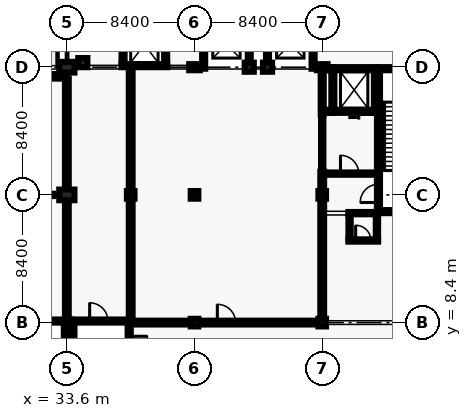
"""IFC4 building model, lengths in metres.
Left out: names, types, materials, properties, quantities, classifications, styles, units other than length and angle.
Written with IfcOpenShell. Run it as: python <this file> out.ifc"""

import sys

from ifc_helpers import new_model, si_unit, direction, frame, frame_2d, origin, origin_2d, place, context, subcontext, project, spatial, rectangle, extrude, element, fill, save


model = new_model("IFC4")
c1 = context("Model", 3, precision=1e-05, world=origin(), true_north=direction((0.0, 1.0)))
c2 = subcontext(c1, "Body", "Model", "MODEL_VIEW")
j1 = project(units=[si_unit("LENGTHUNIT", "METRE"), si_unit("PLANEANGLEUNIT", "RADIAN")], contexts=[c1])
p1 = place(None, origin())
s1 = spatial("IfcSite", under=j1, at=p1, CompositionType="ELEMENT")
p2 = place(p1, origin())
s2 = spatial("IfcBuilding", under=s1, at=p2, CompositionType="ELEMENT")
p3 = place(p2, frame((0.0, 0.0, 10.2)))
s3 = spatial("IfcBuildingStorey", under=s2, at=p3, CompositionType="ELEMENT", Elevation=10.2)
p4 = place(p3, frame((29.4, 8.5, 0.0), z_axis=(0.0, 0.0, 1.0), x_axis=(1.0, 0.0, 0.0)))
e1 = element("IfcWall", 1, at=p4, inside=s3, PredefinedType="SHEAR", context=c2, shape_type="SweptSolid", body=[
    extrude(rectangle(XDim=4.2, YDim=0.2, at=frame_2d((2.1, 0.0))), origin(), (0.0, 0.0, 1.0), 4.8),
])
p5 = place(p4, frame((1.5, 0.0, 0.0)))
e2 = element("IfcOpeningElement", 2, at=p5, cuts=e1, PredefinedType="OPENING", context=c2, shape_type="SweptSolid", body=[
    extrude(rectangle(XDim=1.2, YDim=2.1, at=frame_2d((0.6, 1.05))), frame((0.0, 0.11, 0.0), z_axis=(0.0, -1.0, 0.0), x_axis=(1.0, 0.0, 0.0)), (0.0, 0.0, 1.0), 0.22),
])
p6 = place(p3, frame((33.5, 8.4, 0.0), z_axis=(0.0, 0.0, 1.0), x_axis=(0.0, -1.0, 0.0)))
e3 = element("IfcWall", 3, at=p6, inside=s3, PredefinedType="SHEAR", context=c2, shape_type="SweptSolid", body=[
    extrude(rectangle(XDim=8.2, YDim=0.2, at=frame_2d((4.1, 0.0))), origin(), (0.0, 0.0, 1.0), 4.8),
])
p7 = place(p3, frame((33.9, 8.5, 0.0), z_axis=(0.0, 0.0, 1.0), x_axis=(1.0, 0.0, 0.0)))
e4 = element("IfcWall", 4, at=p7, inside=s3, PredefinedType="SHEAR", context=c2, shape_type="SweptSolid", body=[
    extrude(rectangle(XDim=3.9, YDim=0.2, at=frame_2d((1.95, 0.0))), origin(), (0.0, 0.0, 1.0), 4.8),
])
p8 = place(p7, frame((1.2, 0.0, 0.0)))
e5 = element("IfcOpeningElement", 5, at=p8, cuts=e4, PredefinedType="OPENING", context=c2, shape_type="SweptSolid", body=[
    extrude(rectangle(XDim=1.2, YDim=2.1, at=frame_2d((0.6, 1.05))), frame((0.0, 0.11, 0.0), z_axis=(0.0, -1.0, 0.0), x_axis=(1.0, 0.0, 0.0)), (0.0, 0.0, 1.0), 0.22),
])
p9 = place(p3, frame((34.0, 0.2, 0.0), z_axis=(0.0, 0.0, 1.0), x_axis=(0.0, 1.0, 0.0)))
e6 = element("IfcWall", 6, at=p9, inside=s3, PredefinedType="SHEAR", context=c2, shape_type="SweptSolid", body=[
    extrude(rectangle(XDim=8.2, YDim=0.2, at=frame_2d((4.1, 0.0))), origin(), (0.0, 0.0, 1.0), 4.8),
])
p10 = place(p3, frame((37.7, 8.4, 0.0), z_axis=(0.0, 0.0, 1.0), x_axis=(0.0, -1.0, 0.0)))
e7 = element("IfcWall", 7, at=p10, inside=s3, PredefinedType="SHEAR", context=c2, shape_type="SweptSolid", body=[
    extrude(rectangle(XDim=8.2, YDim=0.2, at=frame_2d((4.1, 0.0))), origin(), (0.0, 0.0, 1.0), 4.8),
])
p11 = place(p10, frame((0.9, 0.0, 0.0)))
e8 = element("IfcOpeningElement", 8, at=p11, cuts=e7, PredefinedType="OPENING", context=c2, shape_type="SweptSolid", body=[
    extrude(rectangle(XDim=1.2, YDim=2.1, at=frame_2d((0.6, 1.05))), frame((0.0, 0.11, 0.0), z_axis=(0.0, -1.0, 0.0), x_axis=(1.0, 0.0, 0.0)), (0.0, 0.0, 1.0), 0.22),
])
p12 = place(p3, frame((58.8, 15.7, 0.0), z_axis=(0.0, 0.0, 1.0), x_axis=(-1.0, 0.0, 0.0)))
e9 = element("IfcWall", 9, at=p12, inside=s3, PredefinedType="SHEAR", context=c2, shape_type="SweptSolid", body=[
    extrude(rectangle(XDim=4.8, YDim=0.2, at=frame_2d((2.4, 0.0))), origin(), (0.0, 0.0, 1.0), 4.8),
])
p13 = place(p12, frame((1.9, 0.0, 0.0)))
e10 = element("IfcOpeningElement", 10, at=p13, cuts=e9, PredefinedType="OPENING", context=c2, shape_type="SweptSolid", body=[
    extrude(rectangle(XDim=1.2, YDim=2.1, at=frame_2d((0.6, 1.05))), frame((0.0, 0.11, 0.0), z_axis=(0.0, -1.0, 0.0), x_axis=(1.0, 0.0, 0.0)), (0.0, 0.0, 1.0), 0.22),
])
p14 = place(p3, frame((54.0, 25.1, 0.0), z_axis=(0.0, 0.0, 1.0), x_axis=(1.0, 0.0, 0.0)))
e11 = element("IfcWall", 11, at=p14, inside=s3, PredefinedType="SHEAR", context=c2, shape_type="SweptSolid", body=[
    extrude(rectangle(XDim=4.8, YDim=0.2, at=frame_2d((2.4, 0.0))), origin(), (0.0, 0.0, 1.0), 4.8),
])
p15 = place(p3, frame((54.1, 15.8, 0.0), z_axis=(0.0, 0.0, 1.0), x_axis=(0.0, 1.0, 0.0)))
e12 = element("IfcWall", 12, at=p15, inside=s3, PredefinedType="SHEAR", context=c2, shape_type="SweptSolid", body=[
    extrude(rectangle(XDim=9.2, YDim=0.2, at=frame_2d((4.6, 0.0))), origin(), (0.0, 0.0, 1.0), 4.8),
])
p16 = place(p15, frame((0.5, 0.0, 0.0)))
e13 = element("IfcOpeningElement", 13, at=p16, cuts=e12, PredefinedType="OPENING", context=c2, shape_type="SweptSolid", body=[
    extrude(rectangle(XDim=1.2, YDim=2.1, at=frame_2d((0.6, 1.05))), frame((0.0, 0.11, 0.0), z_axis=(0.0, -1.0, 0.0), x_axis=(1.0, 0.0, 0.0)), (0.0, 0.0, 1.0), 0.22),
])
p17 = place(p3, frame((54.0, 22.3, 0.0), z_axis=(0.0, 0.0, 1.0), x_axis=(-1.0, 0.0, 0.0)))
e14 = element("IfcWall", 14, at=p17, inside=s3, PredefinedType="SHEAR", context=c2, shape_type="SweptSolid", body=[
    extrude(rectangle(XDim=3.0, YDim=0.2, at=frame_2d((1.5, 0.0))), origin(), (0.0, 0.0, 1.0), 4.8),
])
p18 = place(p17, frame((0.95, 0.0, 0.0)))
e15 = element("IfcOpeningElement", 15, at=p18, cuts=e14, PredefinedType="OPENING", context=c2, shape_type="SweptSolid", body=[
    extrude(rectangle(XDim=1.1, YDim=2.1, at=frame_2d((0.55, 1.05))), frame((0.0, 0.11, 0.0), z_axis=(0.0, -1.0, 0.0), x_axis=(1.0, 0.0, 0.0)), (0.0, 0.0, 1.0), 0.22),
])
p19 = place(p3, frame((51.0, 25.1, 0.0), z_axis=(0.0, 0.0, 1.0), x_axis=(1.0, 0.0, 0.0)))
e16 = element("IfcWall", 16, at=p19, inside=s3, PredefinedType="SHEAR", context=c2, shape_type="SweptSolid", body=[
    extrude(rectangle(XDim=3.0, YDim=0.2, at=frame_2d((1.5, 0.0))), origin(), (0.0, 0.0, 1.0), 4.8),
])
for number, where, z_axis, x_axis in (
    (17, (51.1, 22.4, 0.0), (0.0, 0.0, 1.0), (0.0, 1.0, 0.0)),
    (18, (53.9, 25.0, 0.0), (0.0, 0.0, 1.0), (0.0, -1.0, 0.0)),
):
    element("IfcWall", number, at=place(p3, frame(where, z_axis=z_axis, x_axis=x_axis)), inside=s3, PredefinedType="SHEAR", context=c2, shape_type="SweptSolid", body=[
        extrude(rectangle(XDim=2.6, YDim=0.2, at=frame_2d((1.3, 0.0))), origin(), (0.0, 0.0, 1.0), 4.8),
    ])
p20 = place(p3, frame((40.2, 25.3, 0.0), z_axis=(0.0, 0.0, 1.0), x_axis=(-1.0, 0.0, 0.0)))
e19 = element("IfcWall", 19, at=p20, inside=s3, PredefinedType="SHEAR", context=c2, shape_type="SweptSolid", body=[
    extrude(rectangle(XDim=3.0, YDim=0.2, at=frame_2d((1.5, 0.0))), origin(), (0.0, 0.0, 1.0), 4.8),
])
for number, where, z_axis, x_axis in (
    (20, (37.3, 25.4, 0.0), (0.0, 0.0, 1.0), (0.0, 1.0, 0.0)),
    (21, (40.1, 28.0, 0.0), (0.0, 0.0, 1.0), (0.0, -1.0, 0.0)),
):
    element("IfcWall", number, at=place(p3, frame(where, z_axis=z_axis, x_axis=x_axis)), inside=s3, PredefinedType="SHEAR", context=c2, shape_type="SweptSolid", body=[
        extrude(rectangle(XDim=2.6, YDim=0.2, at=frame_2d((1.3, 0.0))), origin(), (0.0, 0.0, 1.0), 4.8),
    ])
for number, where, z_axis, x_axis in (
    (22, (33.6, 16.8, 0.0), (0.0, 0.0, 1.0), (0.0, 1.0, 0.0)),
    (23, (33.6, 25.2, 0.0), (0.0, 0.0, 1.0), (1.0, 0.0, 0.0)),
):
    element("IfcColumn", number, at=place(p3, frame(where, z_axis=z_axis, x_axis=x_axis)), inside=s3, PredefinedType="COLUMN", context=c2, shape_type="SweptSolid", body=[
        extrude(rectangle(XDim=1.0, YDim=0.7, at=origin_2d()), origin(), (0.0, 0.0, 1.0), 4.8),
    ])
for number, where, z_axis, x_axis in (
    (24, (42.0, 8.4, 0.0), (0.0, 0.0, 1.0), (1.0, 0.0, 0.0)),
    (25, (42.0, 16.8, 0.0), (0.0, 0.0, 1.0), (1.0, 0.0, 0.0)),
):
    element("IfcColumn", number, at=place(p3, frame(where, z_axis=z_axis, x_axis=x_axis)), inside=s3, PredefinedType="COLUMN", context=c2, shape_type="SweptSolid", body=[
        extrude(rectangle(XDim=0.5, YDim=0.5, at=origin_2d()), origin(), (0.0, 0.0, 1.0), 4.8),
    ])
p21 = place(p3, frame((42.0, 25.2, 0.0), z_axis=(0.0, 0.0, 1.0), x_axis=(1.0, 0.0, 0.0)))
e26 = element("IfcColumn", 26, at=p21, inside=s3, PredefinedType="COLUMN", context=c2, shape_type="SweptSolid", body=[
    extrude(rectangle(XDim=0.7, YDim=0.4, at=origin_2d()), origin(), (0.0, 0.0, 1.0), 4.8),
])
for number, where, z_axis, x_axis in (
    (27, (50.4, 8.4, 0.0), (0.0, 0.0, 1.0), (1.0, 0.0, 0.0)),
    (28, (50.4, 16.8, 0.0), (0.0, 0.0, 1.0), (1.0, 0.0, 0.0)),
):
    element("IfcColumn", number, at=place(p3, frame(where, z_axis=z_axis, x_axis=x_axis)), inside=s3, PredefinedType="COLUMN", context=c2, shape_type="SweptSolid", body=[
        extrude(rectangle(XDim=0.5, YDim=0.5, at=origin_2d()), origin(), (0.0, 0.0, 1.0), 4.8),
    ])
p22 = place(p3, frame((50.4, 25.2, 0.0), z_axis=(0.0, 0.0, 1.0), x_axis=(1.0, 0.0, 0.0)))
e29 = element("IfcColumn", 29, at=p22, inside=s3, PredefinedType="COLUMN", context=c2, shape_type="SweptSolid", body=[
    extrude(rectangle(XDim=0.7, YDim=0.4, at=origin_2d()), origin(), (0.0, 0.0, 1.0), 4.8),
])
p23 = place(p3, frame((34.65, 25.5, 0.0), z_axis=(0.0, 0.0, 1.0), x_axis=(1.0, 0.0, 0.0)))
e30 = element("IfcColumn", 30, at=p23, inside=s3, PredefinedType="COLUMN", context=c2, shape_type="SweptSolid", body=[
    extrude(rectangle(XDim=0.6, YDim=0.6, at=origin_2d()), origin(), (0.0, 0.0, 1.0), 4.8),
])
p24 = place(p3, frame((33.6, 8.5, 0.0), z_axis=(0.0, 0.0, 1.0), x_axis=(1.0, 0.0, 0.0)))
e31 = element("IfcWall", 31, at=p24, inside=s3, PredefinedType="SHEAR", context=c2, shape_type="SweptSolid", body=[
    extrude(rectangle(XDim=0.3, YDim=0.2, at=frame_2d((0.15, 0.0))), origin(), (0.0, 0.0, 1.0), 4.8),
])
p25 = place(p3, frame((51.0, 22.3, 0.0), z_axis=(0.0, 0.0, 1.0), x_axis=(-1.0, 0.0, 0.0)))
e32 = element("IfcWall", 32, at=p25, inside=s3, PredefinedType="SHEAR", context=c2, shape_type="SweptSolid", body=[
    extrude(rectangle(XDim=0.5, YDim=0.2, at=frame_2d((0.25, 0.0))), origin(), (0.0, 0.0, 1.0), 4.8),
])
p26 = place(p3, frame((50.75, 25.1, 0.0), z_axis=(0.0, 0.0, 1.0), x_axis=(1.0, 0.0, 0.0)))
e33 = element("IfcWall", 33, at=p26, inside=s3, PredefinedType="SHEAR", context=c2, shape_type="SweptSolid", body=[
    extrude(rectangle(XDim=0.25, YDim=0.2, at=frame_2d((0.125, 0.0))), origin(), (0.0, 0.0, 1.0), 4.8),
])
for number, where, z_axis, x_axis in (
    (34, (45.599, 25.2, 0.0), (0.0, 0.0, 1.0), (1.0, 0.0, 0.0)),
    (35, (46.801, 25.2, 0.0), (0.0, 0.0, 1.0), (1.0, 0.0, 0.0)),
):
    element("IfcColumn", number, at=place(p3, frame(where, z_axis=z_axis, x_axis=x_axis)), inside=s3, PredefinedType="COLUMN", context=c2, shape_type="SweptSolid", body=[
        extrude(rectangle(XDim=0.6, YDim=0.6, at=origin_2d()), origin(), (0.0, 0.0, 1.0), 4.8),
    ])
p27 = place(p3, frame((37.801, 16.8, 0.0), z_axis=(0.0, 0.0, 1.0), x_axis=(1.0, 0.0, 0.0)))
e36 = element("IfcColumn", 36, at=p27, inside=s3, PredefinedType="COLUMN", context=c2, shape_type="SweptSolid", body=[
    extrude(rectangle(XDim=0.5, YDim=0.5, at=origin_2d()), origin(), (0.0, 0.0, 1.0), 4.8),
])
p28 = place(p3, frame((26.95, 24.6, 0.0), z_axis=(0.0, 0.0, 1.0), x_axis=(1.0, 0.0, 0.0)))
e37 = element("IfcWall", 37, at=p28, inside=s3, PredefinedType="SOLIDWALL", context=c2, shape_type="SweptSolid", body=[
    extrude(rectangle(XDim=6.525, YDim=0.3, at=frame_2d((3.262, 0.0))), origin(), (0.0, 0.0, 1.0), 4.5),
])
p29 = place(p28, frame((1.825, 0.0, 0.9)))
e38 = element("IfcOpeningElement", 38, at=p29, cuts=e37, PredefinedType="OPENING", context=c2, shape_type="SweptSolid", body=[
    extrude(rectangle(XDim=2.4, YDim=1.5, at=frame_2d((1.2, 0.75))), frame((0.0, 0.16, 0.0), z_axis=(0.0, -1.0, 0.0), x_axis=(1.0, 0.0, 0.0)), (0.0, 0.0, 1.0), 0.32),
])
p30 = place(p3, frame((37.675, 8.4, 0.0), z_axis=(0.0, 0.0, 1.0), x_axis=(1.0, 0.0, 0.0)))
e39 = element("IfcWall", 39, at=p30, inside=s3, PredefinedType="PARTITIONING", context=c2, shape_type="SweptSolid", body=[
    extrude(rectangle(XDim=12.85, YDim=0.25, at=frame_2d((6.425, 0.0))), origin(), (0.0, 0.0, 1.0), 3.8),
])
p31 = place(p30, frame((5.825, 0.0, 0.0)))
e40 = element("IfcOpeningElement", 40, at=p31, cuts=e39, PredefinedType="OPENING", context=c2, shape_type="SweptSolid", body=[
    extrude(rectangle(XDim=1.2, YDim=2.1, at=frame_2d((0.6, 1.05))), frame((0.0, 0.135, 0.0), z_axis=(0.0, -1.0, 0.0), x_axis=(1.0, 0.0, 0.0)), (0.0, 0.0, 1.0), 0.27),
])
p32 = place(p3, frame((33.6, 8.6, 0.0), z_axis=(0.0, 0.0, 1.0), x_axis=(0.0, 1.0, 0.0)))
e41 = element("IfcWall", 41, at=p32, inside=s3, PredefinedType="SOLIDWALL", context=c2, shape_type="SweptSolid", body=[
    extrude(rectangle(XDim=15.85, YDim=0.25, at=frame_2d((7.925, 0.0))), origin(), (0.0, 0.0, 1.0), 3.8),
])
p33 = place(p3, frame((37.8, 8.525, 0.0), z_axis=(0.0, 0.0, 1.0), x_axis=(0.0, 1.0, 0.0)))
e42 = element("IfcWall", 42, at=p33, inside=s3, PredefinedType="PARTITIONING", context=c2, shape_type="SweptSolid", body=[
    extrude(rectangle(XDim=16.675, YDim=0.25, at=frame_2d((8.337, 0.0))), origin(), (0.0, 0.0, 1.0), 3.8),
])
p34 = place(p3, frame((50.4, 8.525, 0.0), z_axis=(0.0, 0.0, 1.0), x_axis=(0.0, 1.0, 0.0)))
e43 = element("IfcWall", 43, at=p34, inside=s3, PredefinedType="PARTITIONING", context=c2, shape_type="SweptSolid", body=[
    extrude(rectangle(XDim=9.8, YDim=0.25, at=frame_2d((4.9, 0.0))), origin(), (0.0, 0.0, 1.0), 3.8),
])
for number, where, z_axis, x_axis in (
    (44, (42.6, 25.1, 0.0), (0.0, 0.0, 1.0), (0.0, 1.0, 0.0)),
    (45, (45.6, 25.1, 0.0), (0.0, 0.0, 1.0), (0.0, 1.0, 0.0)),
    (46, (46.8, 25.1, 0.0), (0.0, 0.0, 1.0), (0.0, 1.0, 0.0)),
    (47, (49.8, 25.1, 0.0), (0.0, 0.0, 1.0), (0.0, 1.0, 0.0)),
):
    element("IfcWall", number, at=place(p3, frame(where, z_axis=z_axis, x_axis=x_axis)), inside=s3, PredefinedType="SHEAR", context=c2, shape_type="SweptSolid", body=[
        extrude(rectangle(XDim=3.0, YDim=0.2, at=frame_2d((1.5, 0.0))), origin(), (0.0, 0.0, 1.0), 4.5),
    ])
p35 = place(p3, frame((50.4, 22.1, 0.0), z_axis=(0.0, 0.0, 1.0), x_axis=(0.0, 1.0, 0.0)))
e48 = element("IfcWall", 48, at=p35, inside=s3, PredefinedType="SHEAR", context=c2, shape_type="SweptSolid", body=[
    extrude(rectangle(XDim=3.2, YDim=0.2, at=frame_2d((1.6, 0.0))), origin(), (0.0, 0.0, 1.0), 4.5),
])
p36 = place(p3, frame((52.125, 13.8, 0.0), z_axis=(0.0, 0.0, 1.0), x_axis=(1.0, 0.0, 0.0)))
e49 = element("IfcWall", 49, at=p36, inside=s3, PredefinedType="PARTITIONING", context=c2, shape_type="SweptSolid", body=[
    extrude(rectangle(XDim=1.95, YDim=0.15, at=frame_2d((0.975, 0.0))), origin(), (0.0, 0.0, 1.0), 4.5),
])
p37 = place(p36, frame((0.475, 0.0, 0.0)))
e50 = element("IfcOpeningElement", 50, at=p37, cuts=e49, PredefinedType="OPENING", context=c2, shape_type="SweptSolid", body=[
    extrude(rectangle(XDim=1.0, YDim=2.1, at=frame_2d((0.5, 1.05))), frame((0.0, 0.085, 0.0), z_axis=(0.0, -1.0, 0.0), x_axis=(1.0, 0.0, 0.0)), (0.0, 0.0, 1.0), 0.17),
])
p38 = place(p3, frame((52.125, 15.6, 0.0), z_axis=(0.0, 0.0, 1.0), x_axis=(1.0, 0.0, 0.0)))
e51 = element("IfcWall", 51, at=p38, inside=s3, PredefinedType="PARTITIONING", context=c2, shape_type="SweptSolid", body=[
    extrude(rectangle(XDim=1.95, YDim=0.15, at=frame_2d((0.975, 0.0))), origin(), (0.0, 0.0, 1.0), 4.5),
])
p39 = place(p3, frame((25.125, 16.8, 0.0), z_axis=(0.0, 0.0, 1.0), x_axis=(1.0, 0.0, 0.0)))
e52 = element("IfcWall", 52, at=p39, inside=s3, PredefinedType="PARTITIONING", context=c2, shape_type="SweptSolid", body=[
    extrude(rectangle(XDim=7.575, YDim=0.15, at=frame_2d((3.788, 0.0))), origin(), (0.0, 0.0, 1.0), 3.8),
])
p40 = place(p39, frame((3.775, 0.0, 0.0)))
e53 = element("IfcOpeningElement", 53, at=p40, cuts=e52, PredefinedType="OPENING", context=c2, shape_type="SweptSolid", body=[
    extrude(rectangle(XDim=1.0, YDim=2.1, at=frame_2d((0.5, 1.05))), frame((0.0, 0.085, 0.0), z_axis=(0.0, -1.0, 0.0), x_axis=(1.0, 0.0, 0.0)), (0.0, 0.0, 1.0), 0.17),
])
p41 = place(p3, frame((50.525, 18.2, 0.0), z_axis=(0.0, 0.0, 1.0), x_axis=(1.0, 0.0, 0.0)))
e54 = element("IfcWall", 54, at=p41, inside=s3, PredefinedType="SOLIDWALL", context=c2, shape_type="SweptSolid", body=[
    extrude(rectangle(XDim=3.475, YDim=0.15, at=frame_2d((1.738, 0.0))), origin(), (0.0, 0.0, 1.0), 3.8),
])
p42 = place(p41, frame((1.075, 0.0, 0.0)))
e55 = element("IfcOpeningElement", 55, at=p42, cuts=e54, PredefinedType="OPENING", context=c2, shape_type="SweptSolid", body=[
    extrude(rectangle(XDim=1.2, YDim=2.1, at=frame_2d((0.6, 1.05))), frame((0.0, 0.085, 0.0), z_axis=(0.0, -1.0, 0.0), x_axis=(1.0, 0.0, 0.0)), (0.0, 0.0, 1.0), 0.17),
])
for number, where, z_axis, x_axis in (
    (56, (52.2, 13.875, 0.0), (0.0, 0.0, 1.0), (0.0, 1.0, 0.0)),
    (57, (54.0, 13.875, 0.0), (0.0, 0.0, 1.0), (0.0, 1.0, 0.0)),
):
    element("IfcWall", number, at=place(p3, frame(where, z_axis=z_axis, x_axis=x_axis)), inside=s3, PredefinedType="PARTITIONING", context=c2, shape_type="SweptSolid", body=[
        extrude(rectangle(XDim=1.65, YDim=0.15, at=frame_2d((0.825, 0.0))), origin(), (0.0, 0.0, 1.0), 4.5),
    ])
p43 = place(p3, frame((50.4, 18.325, 0.0), z_axis=(0.0, 0.0, 1.0), x_axis=(0.0, 1.0, 0.0)))
e58 = element("IfcWall", 58, at=p43, inside=s3, PredefinedType="SOLIDWALL", context=c2, shape_type="SweptSolid", body=[
    extrude(rectangle(XDim=3.775, YDim=0.15, at=frame_2d((1.888, 0.0))), origin(), (0.0, 0.0, 1.0), 3.8),
])
p44 = place(p18, origin())
e59 = element("IfcDoor", 59, at=p44, inside=s3, OperationType="SLIDING_TO_LEFT", PredefinedType="DOOR", context=c2, shape_type="SweptSolid", body=[
    extrude(rectangle(XDim=1.1, YDim=2.1, at=frame_2d((0.55, 1.05))), frame((0.0, 0.025, 0.0), z_axis=(0.0, -1.0, 0.0), x_axis=(1.0, 0.0, 0.0)), (0.0, 0.0, 1.0), 0.05),
])
fill(e15, e59)
p45 = place(p11, origin())
e60 = element("IfcDoor", 60, at=p45, inside=s3, OperationType="SINGLE_SWING_RIGHT", PredefinedType="DOOR", context=c2, shape_type="SweptSolid", body=[
    extrude(rectangle(XDim=1.2, YDim=2.1, at=frame_2d((0.6, 1.05))), frame((0.0, 0.025, 0.0), z_axis=(0.0, -1.0, 0.0), x_axis=(1.0, 0.0, 0.0)), (0.0, 0.0, 1.0), 0.05),
])
fill(e8, e60)
p46 = place(p8, origin())
e61 = element("IfcDoor", 61, at=p46, inside=s3, OperationType="SINGLE_SWING_RIGHT", PredefinedType="DOOR", context=c2, shape_type="SweptSolid", body=[
    extrude(rectangle(XDim=1.2, YDim=2.1, at=frame_2d((0.6, 1.05))), frame((0.0, 0.025, 0.0), z_axis=(0.0, -1.0, 0.0), x_axis=(1.0, 0.0, 0.0)), (0.0, 0.0, 1.0), 0.05),
])
fill(e5, e61)
p47 = place(p16, origin())
e62 = element("IfcDoor", 62, at=p47, inside=s3, OperationType="SINGLE_SWING_LEFT", PredefinedType="DOOR", context=c2, shape_type="SweptSolid", body=[
    extrude(rectangle(XDim=1.2, YDim=2.1, at=frame_2d((0.6, 1.05))), frame((0.0, 0.025, 0.0), z_axis=(0.0, -1.0, 0.0), x_axis=(1.0, 0.0, 0.0)), (0.0, 0.0, 1.0), 0.05),
])
fill(e13, e62)
p48 = place(p31, origin())
e63 = element("IfcDoor", 63, at=p48, inside=s3, OperationType="SINGLE_SWING_LEFT", PredefinedType="DOOR", context=c2, shape_type="SweptSolid", body=[
    extrude(rectangle(XDim=1.2, YDim=2.1, at=frame_2d((0.6, 1.05))), frame((0.0, 0.025, 0.0), z_axis=(0.0, -1.0, 0.0), x_axis=(1.0, 0.0, 0.0)), (0.0, 0.0, 1.0), 0.05),
])
fill(e40, e63)
p49 = place(p37, origin())
e64 = element("IfcDoor", 64, at=p49, inside=s3, OperationType="SINGLE_SWING_RIGHT", PredefinedType="DOOR", context=c2, shape_type="SweptSolid", body=[
    extrude(rectangle(XDim=1.0, YDim=2.1, at=frame_2d((0.5, 1.05))), frame((0.0, 0.025, 0.0), z_axis=(0.0, -1.0, 0.0), x_axis=(1.0, 0.0, 0.0)), (0.0, 0.0, 1.0), 0.05),
])
fill(e50, e64)
p50 = place(p42, origin())
e65 = element("IfcDoor", 65, at=p50, inside=s3, OperationType="SINGLE_SWING_RIGHT", PredefinedType="DOOR", context=c2, shape_type="SweptSolid", body=[
    extrude(rectangle(XDim=1.2, YDim=2.1, at=frame_2d((0.6, 1.05))), frame((0.0, 0.025, 0.0), z_axis=(0.0, -1.0, 0.0), x_axis=(1.0, 0.0, 0.0)), (0.0, 0.0, 1.0), 0.05),
])
fill(e55, e65)
save(model, sys.argv[1])
